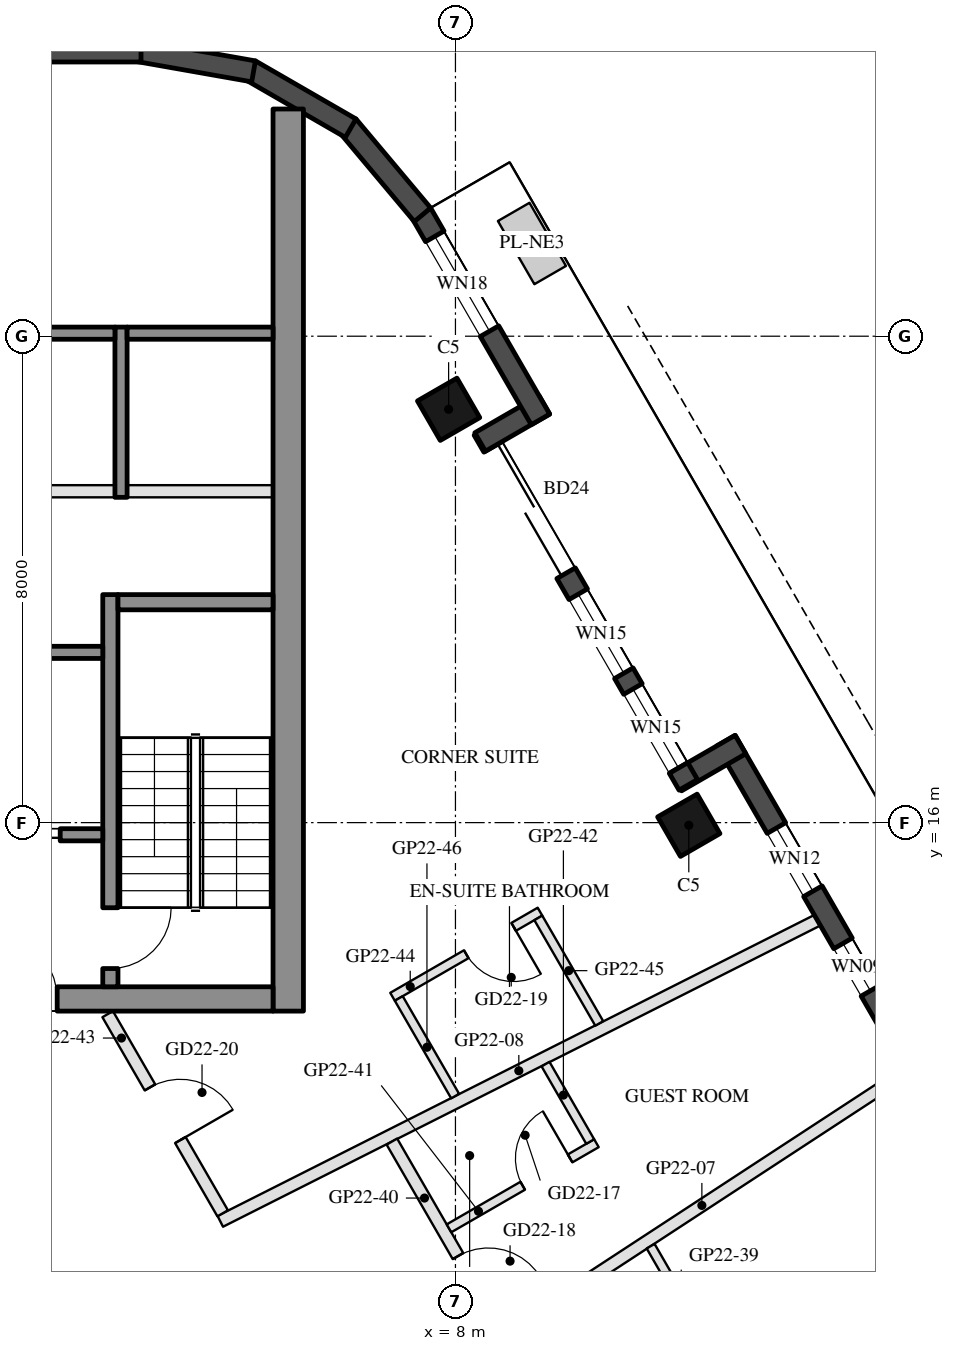
"""IFC4 building model, lengths in metres.
Left out: names, types, materials, properties, quantities, classifications, styles, units other than length and angle.
Written with IfcOpenShell. Run it as: python <this file> out.ifc"""

import sys

from ifc_helpers import new_model, si_unit, direction, frame, frame_2d, origin, origin_2d, place, context, subcontext, project, spatial, rectangle, hollow_rectangle, extrude, element, fill, save


model = new_model("IFC4")
c1 = context("Model", 3, precision=1e-05, world=origin(), true_north=direction((0.0, 1.0)))
c2 = subcontext(c1, "Body", "Model", "MODEL_VIEW")
j1 = project(units=[si_unit("LENGTHUNIT", "METRE"), si_unit("PLANEANGLEUNIT", "RADIAN")], contexts=[c1])
p1 = place(None, origin())
s1 = spatial("IfcSite", under=j1, at=p1, CompositionType="ELEMENT")
p2 = place(p1, origin())
s2 = spatial("IfcBuilding", under=s1, at=p2, CompositionType="ELEMENT")
p3 = place(p2, frame((0.0, 0.0, 228.0)))
s3 = spatial("IfcBuildingStorey", under=s2, at=p3, CompositionType="ELEMENT", Elevation=228.0)
for number, where, z_axis, x_axis in (
    (1, (11.838, 15.957, 0.0), (0.0, 0.0, 1.0), (-0.5, 0.866, 0.0)),
    (2, (7.888, 22.798, 0.0), (0.0, 0.0, 1.0), (-0.5, 0.866, 0.0)),
):
    element("IfcColumn", number, at=place(p3, frame(where, z_axis=z_axis, x_axis=x_axis)), inside=s3, PredefinedType="COLUMN", context=c2, shape_type="SweptSolid", body=[
        extrude(hollow_rectangle(XDim=0.75, YDim=0.75, WallThickness=0.035, at=origin_2d()), origin(), (0.0, 0.0, 1.0), 3.7),
    ])
p4 = place(p3, frame((17.299, 8.948, 0.0), z_axis=(0.0, 0.0, 1.0), x_axis=(-0.500010041276, 0.866019606374, 0.0)))
e3 = element("IfcWall", 3, at=p4, inside=s3, PredefinedType="SOLIDWALL", context=c2, shape_type="SweptSolid", body=[
    extrude(rectangle(XDim=9.7, YDim=0.35, at=frame_2d((4.85, 0.0))), origin(), (0.0, 0.0, 1.0), 3.45),
])
p5 = place(p4, frame((1.637, 0.0, 0.0)))
e4 = element("IfcOpeningElement", 4, at=p5, cuts=e3, PredefinedType="OPENING", context=c2, shape_type="SweptSolid", body=[
    extrude(rectangle(XDim=1.4, YDim=2.4, at=frame_2d((0.7, 1.2))), frame((0.0, 0.185, 0.0), z_axis=(0.0, -1.0, 0.0), x_axis=(1.0, 0.0, 0.0)), (0.0, 0.0, 1.0), 0.37),
])
p6 = place(p4, frame((4.949, 0.0, 0.3)))
e5 = element("IfcOpeningElement", 5, at=p6, cuts=e3, PredefinedType="OPENING", context=c2, shape_type="SweptSolid", body=[
    extrude(rectangle(XDim=0.9, YDim=2.65, at=frame_2d((0.45, 1.325))), frame((0.0, 0.185, 0.0), z_axis=(0.0, -1.0, 0.0), x_axis=(1.0, 0.0, 0.0)), (0.0, 0.0, 1.0), 0.37),
])
p7 = place(p4, frame((6.84, 0.0, 0.3)))
e6 = element("IfcOpeningElement", 6, at=p7, cuts=e3, PredefinedType="OPENING", context=c2, shape_type="SweptSolid", body=[
    extrude(rectangle(XDim=1.2, YDim=2.65, at=frame_2d((0.6, 1.325))), frame((0.0, 0.185, 0.0), z_axis=(0.0, -1.0, 0.0), x_axis=(1.0, 0.0, 0.0)), (0.0, 0.0, 1.0), 0.37),
])
p8 = place(p3, frame((12.688, 17.284, 0.0), z_axis=(0.0, 0.0, 1.0), x_axis=(-0.865955602162, -0.500120880472, 0.0)))
e7 = element("IfcWall", 7, at=p8, inside=s3, PredefinedType="SOLIDWALL", context=c2, shape_type="SweptSolid", body=[
    extrude(rectangle(XDim=1.22, YDim=0.35, at=frame_2d((0.61, 0.0))), origin(), (0.0, 0.0, 1.0), 3.45),
])
p9 = place(p3, frame((11.829, 16.621, 0.0), z_axis=(0.0, 0.0, 1.0), x_axis=(-0.500003597184, 0.866023326939, 0.0)))
e8 = element("IfcWall", 8, at=p9, inside=s3, PredefinedType="SOLIDWALL", context=c2, shape_type="SweptSolid", body=[
    extrude(rectangle(XDim=6.74, YDim=0.35, at=frame_2d((3.37, 0.0))), origin(), (0.0, 0.0, 1.0), 3.45),
])
p10 = place(p9, frame((4.02, 0.0, 0.0)))
e9 = element("IfcOpeningElement", 9, at=p10, cuts=e8, PredefinedType="OPENING", context=c2, shape_type="SweptSolid", body=[
    extrude(rectangle(XDim=2.4, YDim=2.4, at=frame_2d((1.2, 1.2))), frame((0.0, 0.185, 0.0), z_axis=(0.0, -1.0, 0.0), x_axis=(1.0, 0.0, 0.0)), (0.0, 0.0, 1.0), 0.37),
])
p11 = place(p9, frame((0.32, 0.0, 0.3)))
e10 = element("IfcOpeningElement", 10, at=p11, cuts=e8, PredefinedType="OPENING", context=c2, shape_type="SweptSolid", body=[
    extrude(rectangle(XDim=1.5, YDim=2.65, at=frame_2d((0.75, 1.325))), frame((0.0, 0.185, 0.0), z_axis=(0.0, -1.0, 0.0), x_axis=(1.0, 0.0, 0.0)), (0.0, 0.0, 1.0), 0.37),
])
p12 = place(p9, frame((2.12, 0.0, 0.3)))
e11 = element("IfcOpeningElement", 11, at=p12, cuts=e8, PredefinedType="OPENING", context=c2, shape_type="SweptSolid", body=[
    extrude(rectangle(XDim=1.5, YDim=2.65, at=frame_2d((0.75, 1.325))), frame((0.0, 0.185, 0.0), z_axis=(0.0, -1.0, 0.0), x_axis=(1.0, 0.0, 0.0)), (0.0, 0.0, 1.0), 0.37),
])
p13 = place(p3, frame((8.406, 22.26, 0.0), z_axis=(0.0, 0.0, 1.0), x_axis=(0.865955602162, 0.500120880472, 0.0)))
e12 = element("IfcWall", 12, at=p13, inside=s3, PredefinedType="SOLIDWALL", context=c2, shape_type="SweptSolid", body=[
    extrude(rectangle(XDim=1.22, YDim=0.35, at=frame_2d((0.61, 0.0))), origin(), (0.0, 0.0, 1.0), 3.45),
])
p14 = place(p3, frame((9.398, 22.631, 0.0), z_axis=(0.0, 0.0, 1.0), x_axis=(-0.499954521343, 0.866051659307, 0.0)))
e13 = element("IfcWall", 13, at=p14, inside=s3, PredefinedType="SOLIDWALL", context=c2, shape_type="SweptSolid", body=[
    extrude(rectangle(XDim=3.916, YDim=0.35, at=frame_2d((1.958, 0.0))), origin(), (0.0, 0.0, 1.0), 3.45),
])
p15 = place(p14, frame((1.676, 0.0, 0.3)))
e14 = element("IfcOpeningElement", 14, at=p15, cuts=e13, PredefinedType="OPENING", context=c2, shape_type="SweptSolid", body=[
    extrude(rectangle(XDim=1.8, YDim=2.65, at=frame_2d((0.9, 1.325))), frame((0.0, 0.185, 0.0), z_axis=(0.0, -1.0, 0.0), x_axis=(1.0, 0.0, 0.0)), (0.0, 0.0, 1.0), 0.37),
])
p16 = place(p3, frame((7.458, 25.998, 0.0), z_axis=(0.0, 0.0, 1.0), x_axis=(-0.642808304945, 0.766027077259, 0.0)))
e15 = element("IfcWall", 15, at=p16, inside=s3, PredefinedType="SOLIDWALL", context=c2, shape_type="SweptSolid", body=[
    extrude(rectangle(XDim=1.91, YDim=0.35, at=frame_2d((0.955, 0.0))), origin(), (0.0, 0.0, 1.0), 3.45),
])
for number, where, z_axis, x_axis in (
    (16, (6.277, 27.422, 0.0), (0.0, 0.0, 1.0), (-0.866, 0.5, 0.0)),
    (17, (4.68, 28.356, 0.0), (0.0, 0.0, 1.0), (-0.985, 0.174, 0.0)),
):
    element("IfcWall", number, at=place(p3, frame(where, z_axis=z_axis, x_axis=x_axis)), inside=s3, PredefinedType="SOLIDWALL", context=c2, shape_type="SweptSolid", body=[
        extrude(rectangle(XDim=1.91, YDim=0.35, at=frame_2d((0.955, 0.0))), origin(), (0.0, 0.0, 1.0), 3.45),
    ])
p17 = place(p3, frame((2.829, 28.685, 0.0), z_axis=(0.0, 0.0, 1.0), x_axis=(-1.0, 0.0, 0.0)))
e18 = element("IfcWall", 18, at=p17, inside=s3, PredefinedType="SOLIDWALL", context=c2, shape_type="SweptSolid", body=[
    extrude(rectangle(XDim=5.658, YDim=0.35, at=frame_2d((2.829, 0.0))), origin(), (0.0, 0.0, 1.0), 3.45),
])
p18 = place(p3, frame((5.25, 12.9, 0.0), z_axis=(0.0, 0.0, 1.0), x_axis=(0.0, 1.0, 0.0)))
e19 = element("IfcWall", 19, at=p18, inside=s3, PredefinedType="SHEAR", context=c2, shape_type="SweptSolid", body=[
    extrude(rectangle(XDim=14.837, YDim=0.5, at=frame_2d((7.418, 0.0))), origin(), (0.0, 0.0, 1.0), 3.45),
])
p19 = place(p3, frame((5.0, 13.1, 0.0), z_axis=(0.0, 0.0, 1.0), x_axis=(-1.0, 0.0, 0.0)))
e20 = element("IfcWall", 20, at=p19, inside=s3, PredefinedType="SHEAR", context=c2, shape_type="SweptSolid", body=[
    extrude(rectangle(XDim=10.0, YDim=0.4, at=frame_2d((5.0, 0.0))), origin(), (0.0, 0.0, 1.0), 3.45),
])
p20 = place(p19, frame((3.55, 0.0, 0.0)))
e21 = element("IfcOpeningElement", 21, at=p20, cuts=e20, PredefinedType="OPENING", context=c2, shape_type="SweptSolid", body=[
    extrude(rectangle(XDim=1.1, YDim=2.1, at=frame_2d((0.55, 1.05))), frame((0.0, 0.21, 0.0), z_axis=(0.0, -1.0, 0.0), x_axis=(1.0, 0.0, 0.0)), (0.0, 0.0, 1.0), 0.42),
])
p21 = place(p19, frame((5.85, 0.0, 0.0)))
e22 = element("IfcOpeningElement", 22, at=p21, cuts=e20, PredefinedType="OPENING", context=c2, shape_type="SweptSolid", body=[
    extrude(rectangle(XDim=1.4, YDim=2.1, at=frame_2d((0.7, 1.05))), frame((0.0, 0.21, 0.0), z_axis=(0.0, -1.0, 0.0), x_axis=(1.0, 0.0, 0.0)), (0.0, 0.0, 1.0), 0.42),
])
p22 = place(p3, frame((2.325, 13.3, 0.0), z_axis=(0.0, 0.0, 1.0), x_axis=(0.0, 1.0, 0.0)))
e23 = element("IfcWall", 23, at=p22, inside=s3, PredefinedType="SHEAR", context=c2, shape_type="SweptSolid", body=[
    extrude(rectangle(XDim=6.45, YDim=0.25, at=frame_2d((3.225, 0.0))), origin(), (0.0, 0.0, 1.0), 3.45),
])
p23 = place(p22, frame((0.3, 0.0, 0.0)))
e24 = element("IfcOpeningElement", 24, at=p23, cuts=e23, PredefinedType="OPENING", context=c2, shape_type="SweptSolid", body=[
    extrude(rectangle(XDim=1.0, YDim=2.1, at=frame_2d((0.5, 1.05))), frame((0.0, 0.135, 0.0), z_axis=(0.0, -1.0, 0.0), x_axis=(1.0, 0.0, 0.0)), (0.0, 0.0, 1.0), 0.27),
])
p24 = place(p3, frame((5.0, 19.625, 0.0), z_axis=(0.0, 0.0, 1.0), x_axis=(-1.0, 0.0, 0.0)))
e25 = element("IfcWall", 25, at=p24, inside=s3, PredefinedType="SHEAR", context=c2, shape_type="SweptSolid", body=[
    extrude(rectangle(XDim=2.55, YDim=0.25, at=frame_2d((1.275, 0.0))), origin(), (0.0, 0.0, 1.0), 3.45),
])
p25 = place(p3, frame((2.2, 18.8, 0.0), z_axis=(0.0, 0.0, 1.0), x_axis=(-1.0, 0.0, 0.0)))
e26 = element("IfcWall", 26, at=p25, inside=s3, PredefinedType="SHEAR", context=c2, shape_type="SweptSolid", body=[
    extrude(rectangle(XDim=2.8, YDim=0.2, at=frame_2d((1.4, 0.0))), origin(), (0.0, 0.0, 1.0), 3.45),
])
p26 = place(p3, frame((2.2, 15.8, 0.0), z_axis=(0.0, 0.0, 1.0), x_axis=(-1.0, 0.0, 0.0)))
e27 = element("IfcWall", 27, at=p26, inside=s3, PredefinedType="SHEAR", context=c2, shape_type="SweptSolid", body=[
    extrude(rectangle(XDim=2.8, YDim=0.2, at=frame_2d((1.4, 0.0))), origin(), (0.0, 0.0, 1.0), 3.45),
])
p27 = place(p26, frame((0.7, 0.0, 0.0)))
e28 = element("IfcOpeningElement", 28, at=p27, cuts=e27, PredefinedType="OPENING", context=c2, shape_type="SweptSolid", body=[
    extrude(rectangle(XDim=1.2, YDim=2.1, at=frame_2d((0.6, 1.05))), frame((0.0, 0.11, 0.0), z_axis=(0.0, -1.0, 0.0), x_axis=(1.0, 0.0, 0.0)), (0.0, 0.0, 1.0), 0.22),
])
p28 = place(p3, frame((2.5, 21.35, 0.0), z_axis=(0.0, 0.0, 1.0), x_axis=(0.0, 1.0, 0.0)))
e29 = element("IfcWall", 29, at=p28, inside=s3, PredefinedType="SHEAR", context=c2, shape_type="SweptSolid", body=[
    extrude(rectangle(XDim=2.8, YDim=0.2, at=frame_2d((1.4, 0.0))), origin(), (0.0, 0.0, 1.0), 3.45),
])
p29 = place(p3, frame((5.0, 24.05, 0.0), z_axis=(0.0, 0.0, 1.0), x_axis=(-1.0, 0.0, 0.0)))
e30 = element("IfcWall", 30, at=p29, inside=s3, PredefinedType="SHEAR", context=c2, shape_type="SweptSolid", body=[
    extrude(rectangle(XDim=2.4, YDim=0.2, at=frame_2d((1.2, 0.0))), origin(), (0.0, 0.0, 1.0), 3.45),
])
p30 = place(p3, frame((2.4, 24.05, 0.0), z_axis=(0.0, 0.0, 1.0), x_axis=(-1.0, 0.0, 0.0)))
e31 = element("IfcWall", 31, at=p30, inside=s3, PredefinedType="SHEAR", context=c2, shape_type="SweptSolid", body=[
    extrude(rectangle(XDim=2.8, YDim=0.2, at=frame_2d((1.4, 0.0))), origin(), (0.0, 0.0, 1.0), 3.45),
])
p31 = place(p3, frame((5.0, 21.45, 0.0), z_axis=(0.0, 0.0, 1.0), x_axis=(-1.0, 0.0, 0.0)))
e32 = element("IfcWall", 32, at=p31, inside=s3, PredefinedType="PARTITIONING", context=c2, shape_type="SweptSolid", body=[
    extrude(rectangle(XDim=2.4, YDim=0.2, at=frame_2d((1.2, 0.0))), origin(), (0.0, 0.0, 1.0), 3.45),
])
p32 = place(p3, frame((2.4, 21.45, 0.0), z_axis=(0.0, 0.0, 1.0), x_axis=(-1.0, 0.0, 0.0)))
e33 = element("IfcWall", 33, at=p32, inside=s3, PredefinedType="PARTITIONING", context=c2, shape_type="SweptSolid", body=[
    extrude(rectangle(XDim=2.8, YDim=0.2, at=frame_2d((1.4, 0.0))), origin(), (0.0, 0.0, 1.0), 3.45),
])
p33 = place(p3, frame((15.397, 11.892, 0.0), z_axis=(0.0, 0.0, 1.0), x_axis=(-0.836905569615, -0.547347300667, 0.0)))
e34 = element("IfcWall", 34, at=p33, inside=s3, PredefinedType="PARTITIONING", context=c2, shape_type="SweptSolid", body=[
    extrude(rectangle(XDim=7.992, YDim=0.2, at=frame_2d((3.996, 0.0))), origin(), (0.0, 0.0, 1.0), 2.96),
])
p34 = place(p3, frame((13.952, 14.395, 0.0), z_axis=(0.0, 0.0, 1.0), x_axis=(-0.892890171934, -0.450274517226, 0.0)))
e35 = element("IfcWall", 35, at=p34, inside=s3, PredefinedType="PARTITIONING", context=c2, shape_type="SweptSolid", body=[
    extrude(rectangle(XDim=10.998, YDim=0.2, at=frame_2d((5.499, 0.0))), origin(), (0.0, 0.0, 1.0), 2.96),
])
p35 = place(p3, frame((12.211, 7.3, 0.0), z_axis=(0.0, 0.0, 1.0), x_axis=(-0.499982900776, 0.866035275801, 0.0)))
e36 = element("IfcWall", 36, at=p35, inside=s3, PredefinedType="PARTITIONING", context=c2, shape_type="SweptSolid", body=[
    extrude(rectangle(XDim=2.001, YDim=0.15, at=frame_2d((1.001, 0.0))), origin(), (0.0, 0.0, 1.0), 3.45),
])
p36 = place(p3, frame((6.955, 10.754, 0.0), z_axis=(0.0, 0.0, 1.0), x_axis=(0.500018099276, -0.86601495391, 0.0)))
e37 = element("IfcWall", 37, at=p36, inside=s3, PredefinedType="PARTITIONING", context=c2, shape_type="SweptSolid", body=[
    extrude(rectangle(XDim=3.574, YDim=0.2, at=frame_2d((1.787, 0.0))), origin(), (0.0, 0.0, 1.0), 2.76),
])
p37 = place(p36, frame((2.174, 0.0, 0.0)))
e38 = element("IfcOpeningElement", 38, at=p37, cuts=e37, PredefinedType="OPENING", context=c2, shape_type="SweptSolid", body=[
    extrude(rectangle(XDim=1.0, YDim=2.1, at=frame_2d((0.5, 1.05))), frame((0.0, 0.11, 0.0), z_axis=(0.0, -1.0, 0.0), x_axis=(1.0, 0.0, 0.0)), (0.0, 0.0, 1.0), 0.22),
])
p38 = place(p3, frame((7.894, 9.327, 0.0), z_axis=(0.0, 0.0, 1.0), x_axis=(0.865996816683, 0.500049511043, 0.0)))
e39 = element("IfcWall", 39, at=p38, inside=s3, PredefinedType="PARTITIONING", context=c2, shape_type="SweptSolid", body=[
    extrude(rectangle(XDim=2.8, YDim=0.15, at=frame_2d((1.4, 0.0))), origin(), (0.0, 0.0, 1.0), 2.76),
])
p39 = place(p38, frame((1.4, 0.0, 0.0)))
e40 = element("IfcOpeningElement", 40, at=p39, cuts=e39, PredefinedType="OPENING", context=c2, shape_type="SweptSolid", body=[
    extrude(rectangle(XDim=0.9, YDim=2.1, at=frame_2d((0.45, 1.05))), frame((0.0, 0.085, 0.0), z_axis=(0.0, -1.0, 0.0), x_axis=(1.0, 0.0, 0.0)), (0.0, 0.0, 1.0), 0.17),
])
p40 = place(p3, frame((10.216, 10.755, 0.0), z_axis=(0.0, 0.0, 1.0), x_axis=(-0.50001473959, 0.866016893711, 0.0)))
e41 = element("IfcWall", 41, at=p40, inside=s3, PredefinedType="PARTITIONING", context=c2, shape_type="SweptSolid", body=[
    extrude(rectangle(XDim=1.47, YDim=0.15, at=frame_2d((0.735, 0.0))), origin(), (0.0, 0.0, 1.0), 3.45),
])
p41 = place(p3, frame((2.281, 12.85, 0.0), z_axis=(0.0, 0.0, 1.0), x_axis=(0.499985062256, -0.866034027923, 0.0)))
e42 = element("IfcWall", 42, at=p41, inside=s3, PredefinedType="PARTITIONING", context=c2, shape_type="SweptSolid", body=[
    extrude(rectangle(XDim=3.782, YDim=0.2, at=frame_2d((1.891, 0.0))), origin(), (0.0, 0.0, 1.0), 2.76),
])
p42 = place(p41, frame((1.391, 0.0, 0.0)))
e43 = element("IfcOpeningElement", 43, at=p42, cuts=e42, PredefinedType="OPENING", context=c2, shape_type="SweptSolid", body=[
    extrude(rectangle(XDim=1.0, YDim=2.1, at=frame_2d((0.5, 1.05))), frame((0.0, 0.11, 0.0), z_axis=(0.0, -1.0, 0.0), x_axis=(1.0, 0.0, 0.0)), (0.0, 0.0, 1.0), 0.22),
])
p43 = place(p3, frame((9.39, 14.536, 0.0), z_axis=(0.0, 0.0, 1.0), x_axis=(-0.866034573852, -0.49998411664, 0.0)))
e44 = element("IfcWall", 44, at=p43, inside=s3, PredefinedType="PARTITIONING", context=c2, shape_type="SweptSolid", body=[
    extrude(rectangle(XDim=2.8, YDim=0.15, at=frame_2d((1.4, 0.0))), origin(), (0.0, 0.0, 1.0), 2.76),
])
p44 = place(p43, frame((0.5, 0.0, 0.0)))
e45 = element("IfcOpeningElement", 45, at=p44, cuts=e44, PredefinedType="OPENING", context=c2, shape_type="SweptSolid", body=[
    extrude(rectangle(XDim=0.9, YDim=2.1, at=frame_2d((0.45, 1.05))), frame((0.0, 0.085, 0.0), z_axis=(0.0, -1.0, 0.0), x_axis=(1.0, 0.0, 0.0)), (0.0, 0.0, 1.0), 0.17),
])
p45 = place(p3, frame((10.365, 12.698, 0.0), z_axis=(0.0, 0.0, 1.0), x_axis=(-0.500056363668, 0.86599285976, 0.0)))
e46 = element("IfcWall", 46, at=p45, inside=s3, PredefinedType="PARTITIONING", context=c2, shape_type="SweptSolid", body=[
    extrude(rectangle(XDim=2.004, YDim=0.15, at=frame_2d((1.002, 0.0))), origin(), (0.0, 0.0, 1.0), 2.76),
])
p46 = place(p3, frame((7.995, 11.502, 0.0), z_axis=(0.0, 0.0, 1.0), x_axis=(-0.4999770169, 0.866038672677, 0.0)))
e47 = element("IfcWall", 47, at=p46, inside=s3, PredefinedType="PARTITIONING", context=c2, shape_type="SweptSolid", body=[
    extrude(rectangle(XDim=1.854, YDim=0.15, at=frame_2d((0.927, 0.0))), origin(), (0.0, 0.0, 1.0), 2.76),
])
p47 = place(p6, origin())
e48 = element("IfcWindow", 48, at=p47, inside=s3, PartitioningType="SINGLE_PANEL", PredefinedType="WINDOW", context=c2, shape_type="SweptSolid", body=[
    extrude(rectangle(XDim=0.9, YDim=2.65, at=frame_2d((0.45, 1.325))), frame((0.0, 0.03, 0.0), z_axis=(0.0, -1.0, 0.0), x_axis=(1.0, 0.0, 0.0)), (0.0, 0.0, 1.0), 0.06),
])
fill(e5, e48)
p48 = place(p7, origin())
e49 = element("IfcWindow", 49, at=p48, inside=s3, PartitioningType="SINGLE_PANEL", PredefinedType="WINDOW", context=c2, shape_type="SweptSolid", body=[
    extrude(rectangle(XDim=1.2, YDim=2.65, at=frame_2d((0.6, 1.325))), frame((0.0, 0.03, 0.0), z_axis=(0.0, -1.0, 0.0), x_axis=(1.0, 0.0, 0.0)), (0.0, 0.0, 1.0), 0.06),
])
fill(e6, e49)
p49 = place(p10, frame((2.4, 0.0, 0.0), z_axis=(0.0, 0.0, 1.0), x_axis=(-1.0, 0.0, 0.0)))
e50 = element("IfcDoor", 50, at=p49, inside=s3, OperationType="SLIDING_TO_LEFT", PredefinedType="DOOR", context=c2, shape_type="SweptSolid", body=[
    extrude(rectangle(XDim=2.4, YDim=2.4, at=frame_2d((1.2, 1.2))), frame((0.0, 0.025, 0.0), z_axis=(0.0, -1.0, 0.0), x_axis=(1.0, 0.0, 0.0)), (0.0, 0.0, 1.0), 0.05),
])
fill(e9, e50)
p50 = place(p11, origin())
e51 = element("IfcWindow", 51, at=p50, inside=s3, PartitioningType="SINGLE_PANEL", PredefinedType="WINDOW", context=c2, shape_type="SweptSolid", body=[
    extrude(rectangle(XDim=1.5, YDim=2.65, at=frame_2d((0.75, 1.325))), frame((0.0, 0.03, 0.0), z_axis=(0.0, -1.0, 0.0), x_axis=(1.0, 0.0, 0.0)), (0.0, 0.0, 1.0), 0.06),
])
fill(e10, e51)
p51 = place(p12, origin())
e52 = element("IfcWindow", 52, at=p51, inside=s3, PartitioningType="SINGLE_PANEL", PredefinedType="WINDOW", context=c2, shape_type="SweptSolid", body=[
    extrude(rectangle(XDim=1.5, YDim=2.65, at=frame_2d((0.75, 1.325))), frame((0.0, 0.03, 0.0), z_axis=(0.0, -1.0, 0.0), x_axis=(1.0, 0.0, 0.0)), (0.0, 0.0, 1.0), 0.06),
])
fill(e11, e52)
p52 = place(p15, origin())
e53 = element("IfcWindow", 53, at=p52, inside=s3, PartitioningType="SINGLE_PANEL", PredefinedType="WINDOW", context=c2, shape_type="SweptSolid", body=[
    extrude(rectangle(XDim=1.8, YDim=2.65, at=frame_2d((0.9, 1.325))), frame((0.0, 0.03, 0.0), z_axis=(0.0, -1.0, 0.0), x_axis=(1.0, 0.0, 0.0)), (0.0, 0.0, 1.0), 0.06),
])
fill(e14, e53)
p53 = place(p27, origin())
e54 = element("IfcDoor", 54, at=p53, inside=s3, OperationType="DOUBLE_DOOR_SLIDING", PredefinedType="DOOR", context=c2, shape_type="SweptSolid", body=[
    extrude(rectangle(XDim=1.2, YDim=2.1, at=frame_2d((0.6, 1.05))), frame((0.0, 0.025, 0.0), z_axis=(0.0, -1.0, 0.0), x_axis=(1.0, 0.0, 0.0)), (0.0, 0.0, 1.0), 0.05),
])
fill(e28, e54)
p54 = place(p20, frame((1.1, 0.0, 0.0), z_axis=(0.0, 0.0, 1.0), x_axis=(-1.0, 0.0, 0.0)))
e55 = element("IfcDoor", 55, at=p54, inside=s3, OperationType="SINGLE_SWING_LEFT", PredefinedType="DOOR", context=c2, shape_type="SweptSolid", body=[
    extrude(rectangle(XDim=1.1, YDim=2.1, at=frame_2d((0.55, 1.05))), frame((0.0, 0.025, 0.0), z_axis=(0.0, -1.0, 0.0), x_axis=(1.0, 0.0, 0.0)), (0.0, 0.0, 1.0), 0.05),
])
fill(e21, e55)
p55 = place(p23, frame((1.0, 0.0, 0.0), z_axis=(0.0, 0.0, 1.0), x_axis=(-1.0, 0.0, 0.0)))
e56 = element("IfcDoor", 56, at=p55, inside=s3, OperationType="SINGLE_SWING_LEFT", PredefinedType="DOOR", context=c2, shape_type="SweptSolid", body=[
    extrude(rectangle(XDim=1.0, YDim=2.1, at=frame_2d((0.5, 1.05))), frame((0.0, 0.025, 0.0), z_axis=(0.0, -1.0, 0.0), x_axis=(1.0, 0.0, 0.0)), (0.0, 0.0, 1.0), 0.05),
])
fill(e24, e56)
p56 = place(p39, origin())
e57 = element("IfcDoor", 57, at=p56, inside=s3, OperationType="SINGLE_SWING_RIGHT", PredefinedType="DOOR", context=c2, shape_type="SweptSolid", body=[
    extrude(rectangle(XDim=0.9, YDim=2.1, at=frame_2d((0.45, 1.05))), frame((0.0, 0.025, 0.0), z_axis=(0.0, -1.0, 0.0), x_axis=(1.0, 0.0, 0.0)), (0.0, 0.0, 1.0), 0.05),
])
fill(e40, e57)
p57 = place(p37, origin())
e58 = element("IfcDoor", 58, at=p57, inside=s3, OperationType="SINGLE_SWING_RIGHT", PredefinedType="DOOR", context=c2, shape_type="SweptSolid", body=[
    extrude(rectangle(XDim=1.0, YDim=2.1, at=frame_2d((0.5, 1.05))), frame((0.0, 0.025, 0.0), z_axis=(0.0, -1.0, 0.0), x_axis=(1.0, 0.0, 0.0)), (0.0, 0.0, 1.0), 0.05),
])
fill(e38, e58)
p58 = place(p44, origin())
e59 = element("IfcDoor", 59, at=p58, inside=s3, OperationType="SINGLE_SWING_LEFT", PredefinedType="DOOR", context=c2, shape_type="SweptSolid", body=[
    extrude(rectangle(XDim=0.9, YDim=2.1, at=frame_2d((0.45, 1.05))), frame((0.0, 0.025, 0.0), z_axis=(0.0, -1.0, 0.0), x_axis=(1.0, 0.0, 0.0)), (0.0, 0.0, 1.0), 0.05),
])
fill(e45, e59)
p59 = place(p42, origin())
e60 = element("IfcDoor", 60, at=p59, inside=s3, OperationType="SINGLE_SWING_RIGHT", PredefinedType="DOOR", context=c2, shape_type="SweptSolid", body=[
    extrude(rectangle(XDim=1.0, YDim=2.1, at=frame_2d((0.5, 1.05))), frame((0.0, 0.025, 0.0), z_axis=(0.0, -1.0, 0.0), x_axis=(1.0, 0.0, 0.0)), (0.0, 0.0, 1.0), 0.05),
])
fill(e43, e60)
save(model, sys.argv[1])
